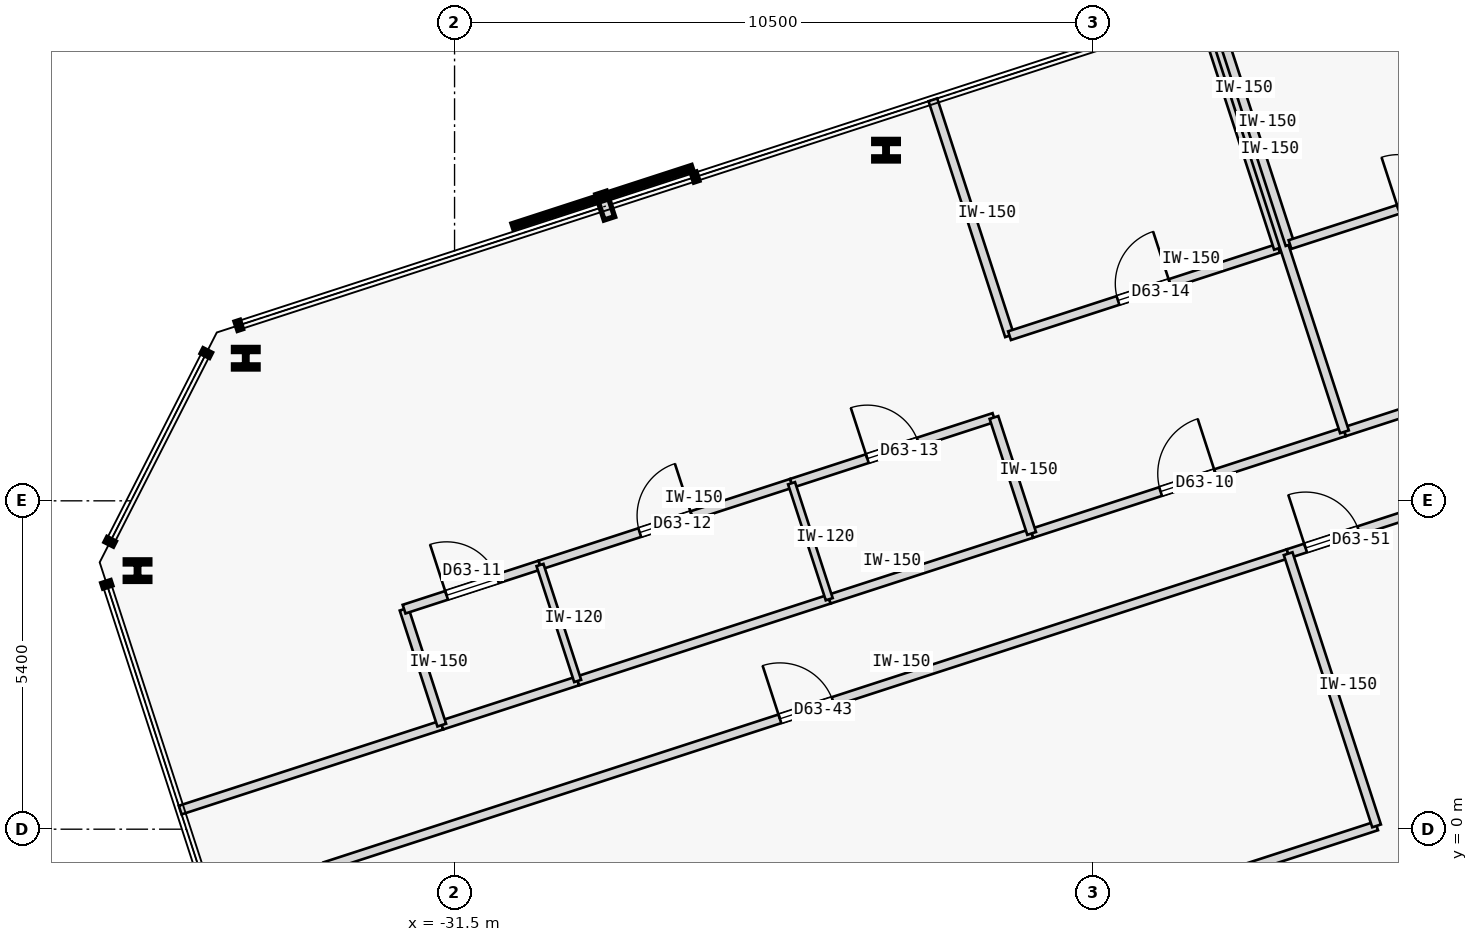
"""IFC4 building model, lengths in metres.
Left out: names, types, materials, properties, quantities, classifications, styles, units other than length and angle.
Written with IfcOpenShell. Run it as: python <this file> out.ifc"""

import sys

from ifc_helpers import new_model, si_unit, direction, frame, frame_2d, origin, origin_2d, place, context, subcontext, project, spatial, rectangle, i_section, extrude, element, fill, save


model = new_model("IFC4")
c1 = context("Model", 3, precision=1e-05, world=origin(), true_north=direction((0.0, 1.0)))
c2 = subcontext(c1, "Body", "Model", "MODEL_VIEW")
j1 = project(units=[si_unit("LENGTHUNIT", "METRE"), si_unit("PLANEANGLEUNIT", "RADIAN")], contexts=[c1])
p1 = place(None, origin())
s1 = spatial("IfcSite", under=j1, at=p1, CompositionType="ELEMENT")
p2 = place(p1, origin())
s2 = spatial("IfcBuilding", under=s1, at=p2, CompositionType="ELEMENT")
p3 = place(p2, frame((0.0, 0.0, 237.7)))
s3 = spatial("IfcBuildingStorey", under=s2, at=p3, CompositionType="ELEMENT", Elevation=237.7)
for number, where, z_axis, x_axis in (
    (1, (-24.404, 11.166, 0.0), (0.0, 0.0, 1.0), (1.0, 0.0, 0.0)),
    (2, (-34.934, 7.745, 0.0), (0.0, 0.0, 1.0), (1.0, 0.0, 0.0)),
    (3, (-36.713, 4.252, 0.0), (0.0, 0.0, 1.0), (1.0, 0.0, 0.0)),
):
    element("IfcColumn", number, at=place(p3, frame(where, z_axis=z_axis, x_axis=x_axis)), inside=s3, PredefinedType="COLUMN", context=c2, shape_type="SweptSolid", body=[
        extrude(i_section(OverallWidth=0.405, OverallDepth=0.355, WebThickness=0.042, FlangeThickness=0.068, FilletRadius=0.015, at=origin_2d()), origin(), (0.0, 0.0, 1.0), 3.35),
    ])
p4 = place(p3, frame((-36.012, 0.314, 0.0), z_axis=(0.0, 0.0, 1.0), x_axis=(0.951052710898, 0.309028705936, 0.0)))
e4 = element("IfcWall", 4, at=p4, inside=s3, PredefinedType="PARTITIONING", context=c2, shape_type="SweptSolid", body=[
    extrude(rectangle(XDim=4.523, YDim=0.15, at=frame_2d((2.261, 0.0))), origin(), (0.0, 0.0, 1.0), 3.125),
])
p5 = place(p3, frame((-22.01, 4.864, 0.0), z_axis=(0.0, 0.0, 1.0), x_axis=(0.951061595649, 0.309001361293, 0.0)))
e5 = element("IfcWall", 5, at=p5, inside=s3, PredefinedType="PARTITIONING", context=c2, shape_type="SweptSolid", body=[
    extrude(rectangle(XDim=5.409, YDim=0.15, at=frame_2d((2.705, 0.0))), origin(), (0.0, 0.0, 1.0), 3.125),
])
p6 = place(p5, frame((2.229, 0.0, 0.0)))
e6 = element("IfcOpeningElement", 6, at=p6, cuts=e5, PredefinedType="OPENING", context=c2, shape_type="SweptSolid", body=[
    extrude(rectangle(XDim=0.95, YDim=2.15, at=frame_2d((0.475, 1.075))), frame((0.0, 0.085, 0.0), z_axis=(0.0, -1.0, 0.0), x_axis=(1.0, 0.0, 0.0)), (0.0, 0.0, 1.0), 0.17),
])
p7 = place(p3, frame((-31.711, 1.712, 0.0), z_axis=(0.0, 0.0, 1.0), x_axis=(0.951076048914, 0.308956872689, 0.0)))
e7 = element("IfcWall", 7, at=p7, inside=s3, PredefinedType="PARTITIONING", context=c2, shape_type="SweptSolid", body=[
    extrude(rectangle(XDim=2.35, YDim=0.15, at=frame_2d((1.175, 0.0))), origin(), (0.0, 0.0, 1.0), 3.125),
])
p8 = place(p3, frame((-29.476, 2.438, 0.0), z_axis=(0.0, 0.0, 1.0), x_axis=(0.951057987102, 0.309012467661, 0.0)))
e8 = element("IfcWall", 8, at=p8, inside=s3, PredefinedType="PARTITIONING", context=c2, shape_type="SweptSolid", body=[
    extrude(rectangle(XDim=4.35, YDim=0.15, at=frame_2d((2.175, 0.0))), origin(), (0.0, 0.0, 1.0), 3.125),
])
p9 = place(p3, frame((-25.338, 3.782, 0.0), z_axis=(0.0, 0.0, 1.0), x_axis=(0.951055596592, 0.309019824916, 0.0)))
e9 = element("IfcWall", 9, at=p9, inside=s3, PredefinedType="PARTITIONING", context=c2, shape_type="SweptSolid", body=[
    extrude(rectangle(XDim=3.5, YDim=0.15, at=frame_2d((1.75, 0.0))), origin(), (0.0, 0.0, 1.0), 3.125),
])
p10 = place(p3, frame((-16.865, 6.535, 0.0), z_axis=(0.0, 0.0, 1.0), x_axis=(0.951049118272, 0.309039762222, 0.0)))
e10 = element("IfcWall", 10, at=p10, inside=s3, PredefinedType="PARTITIONING", context=c2, shape_type="SweptSolid", body=[
    extrude(rectangle(XDim=4.53, YDim=0.15, at=frame_2d((2.265, 0.0))), origin(), (0.0, 0.0, 1.0), 3.125),
])
p11 = place(p3, frame((-33.633, -0.616, 0.0), z_axis=(0.0, 0.0, 1.0), x_axis=(0.951058192995, 0.309011833974, 0.0)))
e11 = element("IfcWall", 11, at=p11, inside=s3, PredefinedType="PARTITIONING", context=c2, shape_type="SweptSolid", body=[
    extrude(rectangle(XDim=16.657, YDim=0.15, at=frame_2d((8.329, 0.0))), origin(), (0.0, 0.0, 1.0), 3.125),
])
p12 = place(p11, frame((7.868, 0.0, 0.0)))
e12 = element("IfcOpeningElement", 12, at=p12, cuts=e11, PredefinedType="OPENING", context=c2, shape_type="SweptSolid", body=[
    extrude(rectangle(XDim=0.92, YDim=2.15, at=frame_2d((0.46, 1.075))), frame((0.0, 0.085, 0.0), z_axis=(0.0, -1.0, 0.0), x_axis=(1.0, 0.0, 0.0)), (0.0, 0.0, 1.0), 0.17),
])
p13 = place(p3, frame((-17.792, 4.531, 0.0), z_axis=(0.0, 0.0, 1.0), x_axis=(0.951047546178, 0.309044600193, 0.0)))
e13 = element("IfcWall", 13, at=p13, inside=s3, PredefinedType="PARTITIONING", context=c2, shape_type="SweptSolid", body=[
    extrude(rectangle(XDim=3.461, YDim=0.15, at=frame_2d((1.73, 0.0))), origin(), (0.0, 0.0, 1.0), 3.125),
])
p14 = place(p13, frame((0.302, 0.0, 0.0)))
e14 = element("IfcOpeningElement", 14, at=p14, cuts=e13, PredefinedType="OPENING", context=c2, shape_type="SweptSolid", body=[
    extrude(rectangle(XDim=0.92, YDim=2.15, at=frame_2d((0.46, 1.075))), frame((0.0, 0.085, 0.0), z_axis=(0.0, -1.0, 0.0), x_axis=(1.0, 0.0, 0.0)), (0.0, 0.0, 1.0), 0.17),
])
p15 = place(p3, frame((-31.711, 1.712, 0.0), z_axis=(0.0, 0.0, 1.0), x_axis=(-0.308948390121, 0.951078804433, 0.0)))
e15 = element("IfcWall", 15, at=p15, inside=s3, PredefinedType="PARTITIONING", context=c2, shape_type="SweptSolid", body=[
    extrude(rectangle(XDim=2.005, YDim=0.15, at=frame_2d((1.002, 0.0))), origin(), (0.0, 0.0, 1.0), 3.125),
])
p16 = place(p3, frame((-32.33, 3.619, 0.0), z_axis=(0.0, 0.0, 1.0), x_axis=(0.951066131077, 0.308987401554, 0.0)))
e16 = element("IfcWall", 16, at=p16, inside=s3, PredefinedType="PARTITIONING", context=c2, shape_type="SweptSolid", body=[
    extrude(rectangle(XDim=2.35, YDim=0.15, at=frame_2d((1.175, 0.0))), origin(), (0.0, 0.0, 1.0), 3.125),
])
p17 = place(p16, frame((0.735, 0.0, 0.0)))
e17 = element("IfcOpeningElement", 17, at=p17, cuts=e16, PredefinedType="OPENING", context=c2, shape_type="SweptSolid", body=[
    extrude(rectangle(XDim=0.88, YDim=2.15, at=frame_2d((0.44, 1.075))), frame((0.0, 0.085, 0.0), z_axis=(0.0, -1.0, 0.0), x_axis=(1.0, 0.0, 0.0)), (0.0, 0.0, 1.0), 0.17),
])
p18 = place(p3, frame((-30.095, 4.345, 0.0), z_axis=(0.0, 0.0, 1.0), x_axis=(0.951041492154, 0.309063230101, 0.0)))
e18 = element("IfcWall", 18, at=p18, inside=s3, PredefinedType="PARTITIONING", context=c2, shape_type="SweptSolid", body=[
    extrude(rectangle(XDim=4.35, YDim=0.15, at=frame_2d((2.175, 0.0))), origin(), (0.0, 0.0, 1.0), 3.125),
])
p19 = place(p18, frame((1.725, 0.0, 0.0)))
e19 = element("IfcOpeningElement", 19, at=p19, cuts=e18, PredefinedType="OPENING", context=c2, shape_type="SweptSolid", body=[
    extrude(rectangle(XDim=0.9, YDim=2.15, at=frame_2d((0.45, 1.075))), frame((0.0, 0.085, 0.0), z_axis=(0.0, -1.0, 0.0), x_axis=(1.0, 0.0, 0.0)), (0.0, 0.0, 1.0), 0.17),
])
p20 = place(p3, frame((-25.958, 5.689, 0.0), z_axis=(0.0, 0.0, 1.0), x_axis=(0.951076095932, 0.308956727951, 0.0)))
e20 = element("IfcWall", 20, at=p20, inside=s3, PredefinedType="PARTITIONING", context=c2, shape_type="SweptSolid", body=[
    extrude(rectangle(XDim=3.5, YDim=0.15, at=frame_2d((1.75, 0.0))), origin(), (0.0, 0.0, 1.0), 3.125),
])
p21 = place(p20, frame((1.31, 0.0, 0.0)))
e21 = element("IfcOpeningElement", 21, at=p21, cuts=e20, PredefinedType="OPENING", context=c2, shape_type="SweptSolid", body=[
    extrude(rectangle(XDim=0.88, YDim=2.15, at=frame_2d((0.44, 1.075))), frame((0.0, 0.085, 0.0), z_axis=(0.0, -1.0, 0.0), x_axis=(1.0, 0.0, 0.0)), (0.0, 0.0, 1.0), 0.17),
])
p22 = place(p3, frame((-22.01, 4.864, 0.0), z_axis=(0.0, 0.0, 1.0), x_axis=(-0.309058537449, 0.951043017129, 0.0)))
e22 = element("IfcWall", 22, at=p22, inside=s3, PredefinedType="PARTITIONING", context=c2, shape_type="SweptSolid", body=[
    extrude(rectangle(XDim=2.005, YDim=0.15, at=frame_2d((1.002, 0.0))), origin(), (0.0, 0.0, 1.0), 3.125),
])
p23 = place(p3, frame((-22.374, 8.115, 0.0), z_axis=(0.0, 0.0, 1.0), x_axis=(-0.308964264858, 0.951073647538, 0.0)))
e23 = element("IfcWall", 23, at=p23, inside=s3, PredefinedType="PARTITIONING", context=c2, shape_type="SweptSolid", body=[
    extrude(rectangle(XDim=4.079, YDim=0.15, at=frame_2d((2.04, 0.0))), origin(), (0.0, 0.0, 1.0), 3.125),
])
p24 = place(p3, frame((-22.374, 8.115, 0.0), z_axis=(0.0, 0.0, 1.0), x_axis=(0.951055286502, 0.309020779263, 0.0)))
e24 = element("IfcWall", 24, at=p24, inside=s3, PredefinedType="PARTITIONING", context=c2, shape_type="SweptSolid", body=[
    extrude(rectangle(XDim=4.65, YDim=0.15, at=frame_2d((2.325, 0.0))), origin(), (0.0, 0.0, 1.0), 3.125),
])
p25 = place(p24, frame((1.875, 0.0, 0.0)))
e25 = element("IfcOpeningElement", 25, at=p25, cuts=e24, PredefinedType="OPENING", context=c2, shape_type="SweptSolid", body=[
    extrude(rectangle(XDim=0.9, YDim=2.15, at=frame_2d((0.45, 1.075))), frame((0.0, 0.085, 0.0), z_axis=(0.0, -1.0, 0.0), x_axis=(1.0, 0.0, 0.0)), (0.0, 0.0, 1.0), 0.17),
])
p26 = place(p3, frame((-17.951, 9.552, 0.0), z_axis=(0.0, 0.0, 1.0), x_axis=(-0.309018403393, 0.951056058476, 0.0)))
e26 = element("IfcWall", 26, at=p26, inside=s3, PredefinedType="PARTITIONING", context=c2, shape_type="SweptSolid", body=[
    extrude(rectangle(XDim=4.079, YDim=0.15, at=frame_2d((2.04, 0.0))), origin(), (0.0, 0.0, 1.0), 3.125),
])
p27 = place(p3, frame((-16.865, 6.535, 0.0), z_axis=(0.0, 0.0, 1.0), x_axis=(-0.309029230739, 0.951052540372, 0.0)))
e27 = element("IfcWall", 27, at=p27, inside=s3, PredefinedType="PARTITIONING", context=c2, shape_type="SweptSolid", body=[
    extrude(rectangle(XDim=7.284, YDim=0.15, at=frame_2d((3.642, 0.0))), origin(), (0.0, 0.0, 1.0), 3.125),
])
p28 = place(p3, frame((-29.476, 2.438, 0.0), z_axis=(0.0, 0.0, 1.0), x_axis=(-0.309058537449, 0.951043017129, 0.0)))
e28 = element("IfcWall", 28, at=p28, inside=s3, PredefinedType="PARTITIONING", context=c2, shape_type="SweptSolid", body=[
    extrude(rectangle(XDim=2.005, YDim=0.12, at=frame_2d((1.002, 0.0))), origin(), (0.0, 0.0, 1.0), 3.125),
])
p29 = place(p3, frame((-25.338, 3.782, 0.0), z_axis=(0.0, 0.0, 1.0), x_axis=(-0.309022749039, 0.951054646472, 0.0)))
e29 = element("IfcWall", 29, at=p29, inside=s3, PredefinedType="PARTITIONING", context=c2, shape_type="SweptSolid", body=[
    extrude(rectangle(XDim=2.005, YDim=0.12, at=frame_2d((1.002, 0.0))), origin(), (0.0, 0.0, 1.0), 3.125),
])
p30 = place(p3, frame((-17.761, 9.614, 0.0), z_axis=(0.0, 0.0, 1.0), x_axis=(-0.309018403393, 0.951056058476, 0.0)))
e30 = element("IfcWall", 30, at=p30, inside=s3, PredefinedType="PARTITIONING", context=c2, shape_type="SweptSolid", body=[
    extrude(rectangle(XDim=4.079, YDim=0.15, at=frame_2d((2.04, 0.0))), origin(), (0.0, 0.0, 1.0), 3.125),
])
p31 = place(p3, frame((-17.761, 9.614, 0.0), z_axis=(0.0, 0.0, 1.0), x_axis=(0.951050272606, 0.309036209813, 0.0)))
e31 = element("IfcWall", 31, at=p31, inside=s3, PredefinedType="PARTITIONING", context=c2, shape_type="SweptSolid", body=[
    extrude(rectangle(XDim=4.65, YDim=0.15, at=frame_2d((2.325, 0.0))), origin(), (0.0, 0.0, 1.0), 3.125),
])
p32 = place(p31, frame((1.875, 0.0, 0.0)))
e32 = element("IfcOpeningElement", 32, at=p32, cuts=e31, PredefinedType="OPENING", context=c2, shape_type="SweptSolid", body=[
    extrude(rectangle(XDim=0.9, YDim=2.15, at=frame_2d((0.45, 1.075))), frame((0.0, 0.085, 0.0), z_axis=(0.0, -1.0, 0.0), x_axis=(1.0, 0.0, 0.0)), (0.0, 0.0, 1.0), 0.17),
])
p33 = place(p3, frame((-32.179, -5.093, 0.0), z_axis=(0.0, 0.0, 1.0), x_axis=(0.951053885426, 0.309025091239, 0.0)))
e33 = element("IfcWall", 33, at=p33, inside=s3, PredefinedType="PARTITIONING", context=c2, shape_type="SweptSolid", body=[
    extrude(rectangle(XDim=16.657, YDim=0.15, at=frame_2d((8.329, 0.0))), origin(), (0.0, 0.0, 1.0), 3.125),
])
p34 = place(p3, frame((-16.337, 0.054, 0.0), z_axis=(0.0, 0.0, 1.0), x_axis=(-0.309029776355, 0.951052363083, 0.0)))
e34 = element("IfcWall", 34, at=p34, inside=s3, PredefinedType="PARTITIONING", context=c2, shape_type="SweptSolid", body=[
    extrude(rectangle(XDim=4.707, YDim=0.15, at=frame_2d((2.354, 0.0))), origin(), (0.0, 0.0, 1.0), 3.125),
])
p35 = place(p6, origin())
e35 = element("IfcDoor", 35, at=p35, inside=s3, OperationType="SINGLE_SWING_RIGHT", PredefinedType="DOOR", context=c2, shape_type="SweptSolid", body=[
    extrude(rectangle(XDim=0.95, YDim=2.15, at=frame_2d((0.475, 1.075))), frame((0.0, 0.025, 0.0), z_axis=(0.0, -1.0, 0.0), x_axis=(1.0, 0.0, 0.0)), (0.0, 0.0, 1.0), 0.05),
])
fill(e6, e35)
p36 = place(p17, origin())
e36 = element("IfcDoor", 36, at=p36, inside=s3, OperationType="SINGLE_SWING_LEFT", PredefinedType="DOOR", context=c2, shape_type="SweptSolid", body=[
    extrude(rectangle(XDim=0.88, YDim=2.15, at=frame_2d((0.44, 1.075))), frame((0.0, 0.025, 0.0), z_axis=(0.0, -1.0, 0.0), x_axis=(1.0, 0.0, 0.0)), (0.0, 0.0, 1.0), 0.05),
])
fill(e17, e36)
p37 = place(p19, origin())
e37 = element("IfcDoor", 37, at=p37, inside=s3, OperationType="SINGLE_SWING_RIGHT", PredefinedType="DOOR", context=c2, shape_type="SweptSolid", body=[
    extrude(rectangle(XDim=0.9, YDim=2.15, at=frame_2d((0.45, 1.075))), frame((0.0, 0.025, 0.0), z_axis=(0.0, -1.0, 0.0), x_axis=(1.0, 0.0, 0.0)), (0.0, 0.0, 1.0), 0.05),
])
fill(e19, e37)
p38 = place(p21, origin())
e38 = element("IfcDoor", 38, at=p38, inside=s3, OperationType="SINGLE_SWING_LEFT", PredefinedType="DOOR", context=c2, shape_type="SweptSolid", body=[
    extrude(rectangle(XDim=0.88, YDim=2.15, at=frame_2d((0.44, 1.075))), frame((0.0, 0.025, 0.0), z_axis=(0.0, -1.0, 0.0), x_axis=(1.0, 0.0, 0.0)), (0.0, 0.0, 1.0), 0.05),
])
fill(e21, e38)
p39 = place(p25, origin())
e39 = element("IfcDoor", 39, at=p39, inside=s3, OperationType="SINGLE_SWING_RIGHT", PredefinedType="DOOR", context=c2, shape_type="SweptSolid", body=[
    extrude(rectangle(XDim=0.9, YDim=2.15, at=frame_2d((0.45, 1.075))), frame((0.0, 0.025, 0.0), z_axis=(0.0, -1.0, 0.0), x_axis=(1.0, 0.0, 0.0)), (0.0, 0.0, 1.0), 0.05),
])
fill(e25, e39)
p40 = place(p32, origin())
e40 = element("IfcDoor", 40, at=p40, inside=s3, OperationType="SINGLE_SWING_LEFT", PredefinedType="DOOR", context=c2, shape_type="SweptSolid", body=[
    extrude(rectangle(XDim=0.9, YDim=2.15, at=frame_2d((0.45, 1.075))), frame((0.0, 0.025, 0.0), z_axis=(0.0, -1.0, 0.0), x_axis=(1.0, 0.0, 0.0)), (0.0, 0.0, 1.0), 0.05),
])
fill(e32, e40)
p41 = place(p12, origin())
e41 = element("IfcDoor", 41, at=p41, inside=s3, OperationType="SINGLE_SWING_LEFT", PredefinedType="DOOR", context=c2, shape_type="SweptSolid", body=[
    extrude(rectangle(XDim=0.92, YDim=2.15, at=frame_2d((0.46, 1.075))), frame((0.0, 0.025, 0.0), z_axis=(0.0, -1.0, 0.0), x_axis=(1.0, 0.0, 0.0)), (0.0, 0.0, 1.0), 0.05),
])
fill(e12, e41)
p42 = place(p14, origin())
e42 = element("IfcDoor", 42, at=p42, inside=s3, OperationType="SINGLE_SWING_LEFT", PredefinedType="DOOR", context=c2, shape_type="SweptSolid", body=[
    extrude(rectangle(XDim=0.92, YDim=2.15, at=frame_2d((0.46, 1.075))), frame((0.0, 0.025, 0.0), z_axis=(0.0, -1.0, 0.0), x_axis=(1.0, 0.0, 0.0)), (0.0, 0.0, 1.0), 0.05),
])
fill(e14, e42)
save(model, sys.argv[1])
